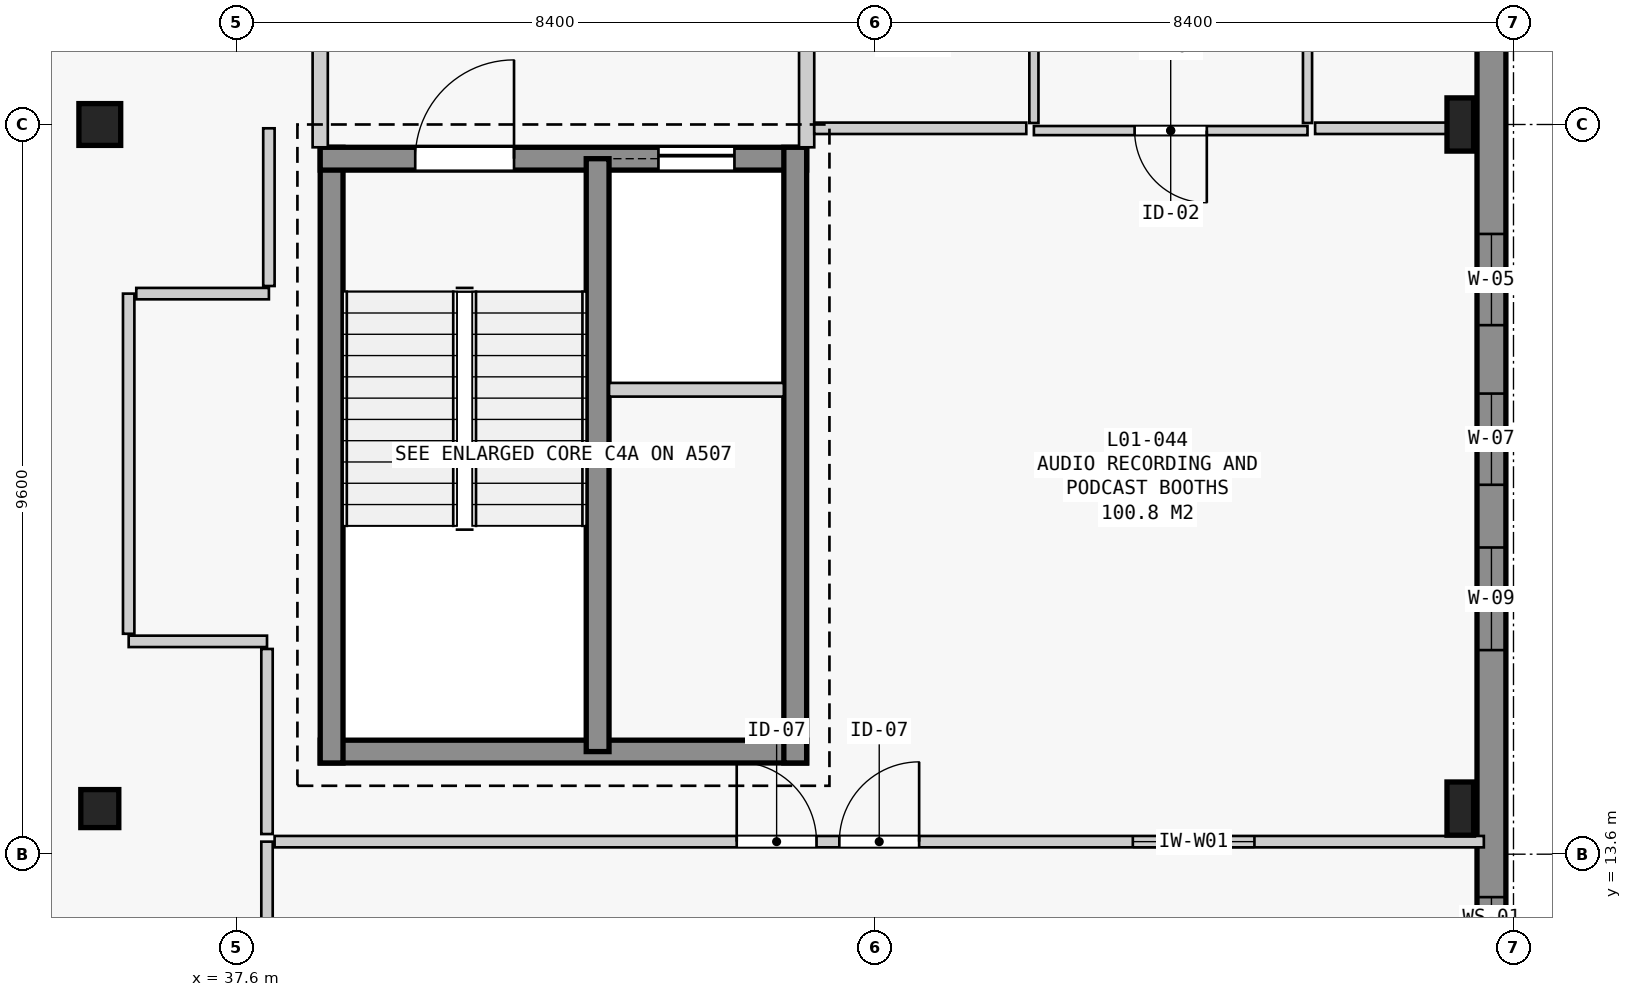
"""IFC4 building model, lengths in metres.
Left out: names, types, materials, properties, quantities, classifications, styles, units other than length and angle.
Written with IfcOpenShell. Run it as: python <this file> out.ifc"""

import sys

from ifc_helpers import new_model, si_unit, direction, frame, frame_2d, origin, origin_2d, place, context, subcontext, project, spatial, rectangle, extrude, element, fill, save


model = new_model("IFC4")
c1 = context("Model", 3, precision=1e-05, world=origin(), true_north=direction((0.0, 1.0)))
c2 = subcontext(c1, "Body", "Model", "MODEL_VIEW")
j1 = project(units=[si_unit("LENGTHUNIT", "METRE"), si_unit("PLANEANGLEUNIT", "RADIAN")], contexts=[c1])
p1 = place(None, origin())
s1 = spatial("IfcSite", under=j1, at=p1, CompositionType="ELEMENT")
p2 = place(p1, origin())
s2 = spatial("IfcBuilding", under=s1, at=p2, CompositionType="ELEMENT")
p3 = place(p2, frame((0.0, 0.0, 5.4)))
s3 = spatial("IfcBuildingStorey", under=s2, at=p3, CompositionType="ELEMENT", Elevation=5.4)
p4 = place(p3, frame((35.8, 14.2, 0.0), z_axis=(0.0, 0.0, 1.0), x_axis=(1.0, 0.0, 0.0)))
e1 = element("IfcColumn", 1, at=p4, inside=s3, PredefinedType="COLUMN", context=c2, shape_type="SweptSolid", body=[
    extrude(rectangle(XDim=0.5, YDim=0.5, at=origin_2d()), origin(), (0.0, 0.0, 1.0), 4.2),
])
p5 = place(p3, frame((35.8, 23.2, 0.0), z_axis=(0.0, 0.0, 1.0), x_axis=(1.0, 0.0, 0.0)))
e2 = element("IfcColumn", 2, at=p5, inside=s3, PredefinedType="COLUMN", context=c2, shape_type="SweptSolid", body=[
    extrude(rectangle(XDim=0.55, YDim=0.55, at=origin_2d()), origin(), (0.0, 0.0, 1.0), 4.2),
])
for number, where, z_axis, x_axis in (
    (3, (53.7, 14.2, 0.0), (0.0, 0.0, 1.0), (1.0, 0.0, 0.0)),
    (4, (53.7, 23.2, 0.0), (0.0, 0.0, 1.0), (1.0, 0.0, 0.0)),
):
    element("IfcColumn", number, at=place(p3, frame(where, z_axis=z_axis, x_axis=x_axis)), inside=s3, PredefinedType="COLUMN", context=c2, shape_type="SweptSolid", body=[
        extrude(rectangle(XDim=0.35, YDim=0.7, at=origin_2d()), origin(), (0.0, 0.0, 1.0), 4.2),
    ])
p6 = place(p3, frame((54.11, 42.11, 0.0), z_axis=(0.0, 0.0, 1.0), x_axis=(0.0, -1.0, 0.0)))
e5 = element("IfcWall", 5, at=p6, inside=s3, PredefinedType="STANDARD", context=c2, shape_type="SweptSolid", body=[
    extrude(rectangle(XDim=37.92, YDim=0.38, at=frame_2d((18.96, 0.0))), origin(), (0.0, 0.0, 1.0), 3.94),
])
p7 = place(p6, frame((1.45, 0.0, 0.95)))
e6 = element("IfcOpeningElement", 6, at=p7, cuts=e5, PredefinedType="OPENING", context=c2, shape_type="SweptSolid", body=[
    extrude(rectangle(XDim=1.2, YDim=2.4, at=frame_2d((0.6, 1.2))), frame((0.0, 0.2, 0.0), z_axis=(0.0, -1.0, 0.0), x_axis=(1.0, 0.0, 0.0)), (0.0, 0.0, 1.0), 0.4),
])
p8 = place(p6, frame((3.475, 0.0, 0.95)))
e7 = element("IfcOpeningElement", 7, at=p8, cuts=e5, PredefinedType="OPENING", context=c2, shape_type="SweptSolid", body=[
    extrude(rectangle(XDim=1.35, YDim=2.5, at=frame_2d((0.675, 1.25))), frame((0.0, 0.2, 0.0), z_axis=(0.0, -1.0, 0.0), x_axis=(1.0, 0.0, 0.0)), (0.0, 0.0, 1.0), 0.4),
])
p9 = place(p6, frame((5.5, 0.0, 0.95)))
e8 = element("IfcOpeningElement", 8, at=p9, cuts=e5, PredefinedType="OPENING", context=c2, shape_type="SweptSolid", body=[
    extrude(rectangle(XDim=1.5, YDim=2.2, at=frame_2d((0.75, 1.1))), frame((0.0, 0.2, 0.0), z_axis=(0.0, -1.0, 0.0), x_axis=(1.0, 0.0, 0.0)), (0.0, 0.0, 1.0), 0.4),
])
p10 = place(p6, frame((8.075, 0.0, 0.95)))
e9 = element("IfcOpeningElement", 9, at=p10, cuts=e5, PredefinedType="OPENING", context=c2, shape_type="SweptSolid", body=[
    extrude(rectangle(XDim=0.55, YDim=2.1, at=frame_2d((0.275, 1.05))), frame((0.0, 0.2, 0.0), z_axis=(0.0, -1.0, 0.0), x_axis=(1.0, 0.0, 0.0)), (0.0, 0.0, 1.0), 0.4),
])
p11 = place(p6, frame((10.15, 0.0, 0.95)))
e10 = element("IfcOpeningElement", 10, at=p11, cuts=e5, PredefinedType="OPENING", context=c2, shape_type="SweptSolid", body=[
    extrude(rectangle(XDim=0.6, YDim=2.2, at=frame_2d((0.3, 1.1))), frame((0.0, 0.2, 0.0), z_axis=(0.0, -1.0, 0.0), x_axis=(1.0, 0.0, 0.0)), (0.0, 0.0, 1.0), 0.4),
])
p12 = place(p6, frame((12.225, 0.0, 0.95)))
e11 = element("IfcOpeningElement", 11, at=p12, cuts=e5, PredefinedType="OPENING", context=c2, shape_type="SweptSolid", body=[
    extrude(rectangle(XDim=0.65, YDim=2.4, at=frame_2d((0.325, 1.2))), frame((0.0, 0.2, 0.0), z_axis=(0.0, -1.0, 0.0), x_axis=(1.0, 0.0, 0.0)), (0.0, 0.0, 1.0), 0.4),
])
p13 = place(p6, frame((14.275, 0.0, 0.95)))
e12 = element("IfcOpeningElement", 12, at=p13, cuts=e5, PredefinedType="OPENING", context=c2, shape_type="SweptSolid", body=[
    extrude(rectangle(XDim=0.75, YDim=2.3, at=frame_2d((0.375, 1.15))), frame((0.0, 0.2, 0.0), z_axis=(0.0, -1.0, 0.0), x_axis=(1.0, 0.0, 0.0)), (0.0, 0.0, 1.0), 0.4),
])
p14 = place(p6, frame((16.3, 0.0, 0.95)))
e13 = element("IfcOpeningElement", 13, at=p14, cuts=e5, PredefinedType="OPENING", context=c2, shape_type="SweptSolid", body=[
    extrude(rectangle(XDim=0.9, YDim=2.2, at=frame_2d((0.45, 1.1))), frame((0.0, 0.2, 0.0), z_axis=(0.0, -1.0, 0.0), x_axis=(1.0, 0.0, 0.0)), (0.0, 0.0, 1.0), 0.4),
])
p15 = place(p6, frame((20.35, 0.0, 0.95)))
e14 = element("IfcOpeningElement", 14, at=p15, cuts=e5, PredefinedType="OPENING", context=c2, shape_type="SweptSolid", body=[
    extrude(rectangle(XDim=1.2, YDim=1.8, at=frame_2d((0.6, 0.9))), frame((0.0, 0.2, 0.0), z_axis=(0.0, -1.0, 0.0), x_axis=(1.0, 0.0, 0.0)), (0.0, 0.0, 1.0), 0.4),
])
p16 = place(p6, frame((22.45, 0.0, 0.95)))
e15 = element("IfcOpeningElement", 15, at=p16, cuts=e5, PredefinedType="OPENING", context=c2, shape_type="SweptSolid", body=[
    extrude(rectangle(XDim=1.2, YDim=2.4, at=frame_2d((0.6, 1.2))), frame((0.0, 0.2, 0.0), z_axis=(0.0, -1.0, 0.0), x_axis=(1.0, 0.0, 0.0)), (0.0, 0.0, 1.0), 0.4),
])
p17 = place(p6, frame((24.475, 0.0, 0.95)))
e16 = element("IfcOpeningElement", 16, at=p17, cuts=e5, PredefinedType="OPENING", context=c2, shape_type="SweptSolid", body=[
    extrude(rectangle(XDim=1.35, YDim=2.5, at=frame_2d((0.675, 1.25))), frame((0.0, 0.2, 0.0), z_axis=(0.0, -1.0, 0.0), x_axis=(1.0, 0.0, 0.0)), (0.0, 0.0, 1.0), 0.4),
])
p18 = place(p6, frame((29.075, 0.0, 0.95)))
e17 = element("IfcOpeningElement", 17, at=p18, cuts=e5, PredefinedType="OPENING", context=c2, shape_type="SweptSolid", body=[
    extrude(rectangle(XDim=0.55, YDim=1.8, at=frame_2d((0.275, 0.9))), frame((0.0, 0.2, 0.0), z_axis=(0.0, -1.0, 0.0), x_axis=(1.0, 0.0, 0.0)), (0.0, 0.0, 1.0), 0.4),
])
p19 = place(p6, frame((31.15, 0.0, 0.95)))
e18 = element("IfcOpeningElement", 18, at=p19, cuts=e5, PredefinedType="OPENING", context=c2, shape_type="SweptSolid", body=[
    extrude(rectangle(XDim=0.6, YDim=1.9, at=frame_2d((0.3, 0.95))), frame((0.0, 0.2, 0.0), z_axis=(0.0, -1.0, 0.0), x_axis=(1.0, 0.0, 0.0)), (0.0, 0.0, 1.0), 0.4),
])
p20 = place(p6, frame((33.225, 0.0, 0.95)))
e19 = element("IfcOpeningElement", 19, at=p20, cuts=e5, PredefinedType="OPENING", context=c2, shape_type="SweptSolid", body=[
    extrude(rectangle(XDim=0.65, YDim=2.0, at=frame_2d((0.325, 1.0))), frame((0.0, 0.2, 0.0), z_axis=(0.0, -1.0, 0.0), x_axis=(1.0, 0.0, 0.0)), (0.0, 0.0, 1.0), 0.4),
])
p21 = place(p6, frame((35.3, 0.0, 0.95)))
e20 = element("IfcOpeningElement", 20, at=p21, cuts=e5, PredefinedType="OPENING", context=c2, shape_type="SweptSolid", body=[
    extrude(rectangle(XDim=0.7, YDim=2.1, at=frame_2d((0.35, 1.05))), frame((0.0, 0.2, 0.0), z_axis=(0.0, -1.0, 0.0), x_axis=(1.0, 0.0, 0.0)), (0.0, 0.0, 1.0), 0.4),
])
p22 = place(p3, frame((45.1, 14.95, 0.0), z_axis=(0.0, 0.0, 1.0), x_axis=(-1.0, 0.0, 0.0)))
e21 = element("IfcWall", 21, at=p22, inside=s3, PredefinedType="SHEAR", context=c2, shape_type="SweptSolid", body=[
    extrude(rectangle(XDim=6.4, YDim=0.3, at=frame_2d((3.2, 0.0))), origin(), (0.0, 0.0, 1.0), 3.94),
])
p23 = place(p3, frame((38.85, 14.8, 0.0), z_axis=(0.0, 0.0, 1.0), x_axis=(0.0, 1.0, 0.0)))
e22 = element("IfcWall", 22, at=p23, inside=s3, PredefinedType="SHEAR", context=c2, shape_type="SweptSolid", body=[
    extrude(rectangle(XDim=8.1, YDim=0.3, at=frame_2d((4.05, 0.0))), origin(), (0.0, 0.0, 1.0), 3.94),
])
p24 = place(p3, frame((38.7, 22.75, 0.0), z_axis=(0.0, 0.0, 1.0), x_axis=(1.0, 0.0, 0.0)))
e23 = element("IfcWall", 23, at=p24, inside=s3, PredefinedType="SHEAR", context=c2, shape_type="SweptSolid", body=[
    extrude(rectangle(XDim=6.4, YDim=0.3, at=frame_2d((3.2, 0.0))), origin(), (0.0, 0.0, 1.0), 3.94),
])
p25 = place(p24, frame((1.25, 0.0, 0.0)))
e24 = element("IfcOpeningElement", 24, at=p25, cuts=e23, PredefinedType="OPENING", context=c2, shape_type="SweptSolid", body=[
    extrude(rectangle(XDim=1.3, YDim=2.2, at=frame_2d((0.65, 1.1))), frame((0.0, 0.16, 0.0), z_axis=(0.0, -1.0, 0.0), x_axis=(1.0, 0.0, 0.0)), (0.0, 0.0, 1.0), 0.32),
])
p26 = place(p24, frame((4.45, 0.0, 0.0)))
e25 = element("IfcOpeningElement", 25, at=p26, cuts=e23, PredefinedType="OPENING", context=c2, shape_type="SweptSolid", body=[
    extrude(rectangle(XDim=1.0, YDim=2.15, at=frame_2d((0.5, 1.075))), frame((0.0, 0.16, 0.0), z_axis=(0.0, -1.0, 0.0), x_axis=(1.0, 0.0, 0.0)), (0.0, 0.0, 1.0), 0.32),
])
p27 = place(p3, frame((44.95, 22.9, 0.0), z_axis=(0.0, 0.0, 1.0), x_axis=(0.0, -1.0, 0.0)))
e26 = element("IfcWall", 26, at=p27, inside=s3, PredefinedType="SHEAR", context=c2, shape_type="SweptSolid", body=[
    extrude(rectangle(XDim=8.1, YDim=0.3, at=frame_2d((4.05, 0.0))), origin(), (0.0, 0.0, 1.0), 3.94),
])
p28 = place(p3, frame((42.35, 14.95, 0.0), z_axis=(0.0, 0.0, 1.0), x_axis=(0.0, 1.0, 0.0)))
e27 = element("IfcWall", 27, at=p28, inside=s3, PredefinedType="SHEAR", context=c2, shape_type="SweptSolid", body=[
    extrude(rectangle(XDim=7.8, YDim=0.3, at=frame_2d((3.9, 0.0))), origin(), (0.0, 0.0, 1.0), 3.94),
])
p29 = place(p3, frame((42.5, 19.71, 0.0), z_axis=(0.0, 0.0, 1.0), x_axis=(1.0, 0.0, 0.0)))
e28 = element("IfcWall", 28, at=p29, inside=s3, PredefinedType="PARTITIONING", context=c2, shape_type="SweptSolid", body=[
    extrude(rectangle(XDim=2.3, YDim=0.18, at=frame_2d((1.15, 0.0))), origin(), (0.0, 0.0, 1.0), 3.94),
])
for number, where, z_axis, x_axis in (
    (29, (38.7, 22.9, 0.0), (0.0, 0.0, 1.0), (0.0, 1.0, 0.0)),
    (30, (45.1, 26.5, 0.0), (0.0, 0.0, 1.0), (0.0, -1.0, 0.0)),
):
    element("IfcWall", number, at=place(p3, frame(where, z_axis=z_axis, x_axis=x_axis)), inside=s3, PredefinedType="STANDARD", context=c2, shape_type="SweptSolid", body=[
        extrude(rectangle(XDim=3.6, YDim=0.2, at=frame_2d((1.8, 0.0))), origin(), (0.0, 0.0, 1.0), 3.12),
    ])
p30 = place(p3, frame((51.69, 23.12, 0.0), z_axis=(0.0, 0.0, 1.0), x_axis=(-1.0, 0.0, 0.0)))
e31 = element("IfcWall", 31, at=p30, inside=s3, PredefinedType="PARTITIONING", context=c2, shape_type="SweptSolid", body=[
    extrude(rectangle(XDim=3.6, YDim=0.12, at=frame_2d((1.8, 0.0))), origin(), (0.0, 0.0, 1.0), 3.12),
])
p31 = place(p30, frame((1.325, 0.0, 0.0)))
e32 = element("IfcOpeningElement", 32, at=p31, cuts=e31, PredefinedType="OPENING", context=c2, shape_type="SweptSolid", body=[
    extrude(rectangle(XDim=0.95, YDim=2.15, at=frame_2d((0.475, 1.075))), frame((0.0, 0.07, 0.0), z_axis=(0.0, -1.0, 0.0), x_axis=(1.0, 0.0, 0.0)), (0.0, 0.0, 1.0), 0.14),
])
p32 = place(p3, frame((48.09, 23.22, 0.0), z_axis=(0.0, 0.0, 1.0), x_axis=(0.0, 1.0, 0.0)))
e33 = element("IfcWall", 33, at=p32, inside=s3, PredefinedType="PARTITIONING", context=c2, shape_type="SweptSolid", body=[
    extrude(rectangle(XDim=3.1, YDim=0.12, at=frame_2d((1.55, 0.0))), origin(), (0.0, 0.0, 1.0), 3.12),
])
p33 = place(p32, frame((1.0, 0.0, 0.0)))
e34 = element("IfcOpeningElement", 34, at=p33, cuts=e33, PredefinedType="OPENING", context=c2, shape_type="SweptSolid", body=[
    extrude(rectangle(XDim=1.1, YDim=2.2, at=frame_2d((0.55, 1.1))), frame((0.0, 0.07, 0.0), z_axis=(0.0, -1.0, 0.0), x_axis=(1.0, 0.0, 0.0)), (0.0, 0.0, 1.0), 0.14),
])
p34 = place(p3, frame((51.69, 26.22, 0.0), z_axis=(0.0, 0.0, 1.0), x_axis=(0.0, -1.0, 0.0)))
e35 = element("IfcWall", 35, at=p34, inside=s3, PredefinedType="PARTITIONING", context=c2, shape_type="SweptSolid", body=[
    extrude(rectangle(XDim=3.0, YDim=0.12, at=frame_2d((1.5, 0.0))), origin(), (0.0, 0.0, 1.0), 3.12),
])
p35 = place(p3, frame((38.0, 12.1, 0.0), z_axis=(0.0, 0.0, 1.0), x_axis=(0.0, 1.0, 0.0)))
e36 = element("IfcWall", 36, at=p35, inside=s3, PredefinedType="PARTITIONING", context=c2, shape_type="SweptSolid", body=[
    extrude(rectangle(XDim=1.665, YDim=0.15, at=frame_2d((0.833, 0.0))), origin(), (0.0, 0.0, 1.0), 3.94),
])
p36 = place(p3, frame((38.1, 13.765, 0.0), z_axis=(0.0, 0.0, 1.0), x_axis=(1.0, 0.0, 0.0)))
e37 = element("IfcWall", 37, at=p36, inside=s3, PredefinedType="PARTITIONING", context=c2, shape_type="SweptSolid", body=[
    extrude(rectangle(XDim=15.91, YDim=0.15, at=frame_2d((7.955, 0.0))), origin(), (0.0, 0.0, 1.0), 3.22),
])
p37 = place(p36, frame((7.43, 0.0, 0.0)))
e38 = element("IfcOpeningElement", 38, at=p37, cuts=e37, PredefinedType="OPENING", context=c2, shape_type="SweptSolid", body=[
    extrude(rectangle(XDim=1.05, YDim=2.2, at=frame_2d((0.525, 1.1))), frame((0.0, 0.085, 0.0), z_axis=(0.0, -1.0, 0.0), x_axis=(1.0, 0.0, 0.0)), (0.0, 0.0, 1.0), 0.17),
])
p38 = place(p36, frame((11.292, 0.0, 1.05)))
e39 = element("IfcOpeningElement", 39, at=p38, cuts=e37, PredefinedType="OPENING", context=c2, shape_type="SweptSolid", body=[
    extrude(rectangle(XDim=1.6, YDim=1.5, at=frame_2d((0.8, 0.75))), frame((0.0, 0.085, 0.0), z_axis=(0.0, -1.0, 0.0), x_axis=(1.0, 0.0, 0.0)), (0.0, 0.0, 1.0), 0.17),
])
p39 = place(p36, frame((6.08, 0.0, 0.0)))
e40 = element("IfcOpeningElement", 40, at=p39, cuts=e37, PredefinedType="OPENING", context=c2, shape_type="SweptSolid", body=[
    extrude(rectangle(XDim=1.05, YDim=2.2, at=frame_2d((0.525, 1.1))), frame((0.0, 0.085, 0.0), z_axis=(0.0, -1.0, 0.0), x_axis=(1.0, 0.0, 0.0)), (0.0, 0.0, 1.0), 0.17),
])
p40 = place(p3, frame((38.0, 16.4, 0.0), z_axis=(0.0, 0.0, 1.0), x_axis=(-1.0, 0.0, 0.0)))
e41 = element("IfcWall", 41, at=p40, inside=s3, PredefinedType="PARTITIONING", context=c2, shape_type="SweptSolid", body=[
    extrude(rectangle(XDim=1.82, YDim=0.15, at=frame_2d((0.91, 0.0))), origin(), (0.0, 0.0, 1.0), 3.94),
])
p41 = place(p3, frame((36.18, 16.5, 0.0), z_axis=(0.0, 0.0, 1.0), x_axis=(0.0, 1.0, 0.0)))
e42 = element("IfcWall", 42, at=p41, inside=s3, PredefinedType="PARTITIONING", context=c2, shape_type="SweptSolid", body=[
    extrude(rectangle(XDim=4.475, YDim=0.15, at=frame_2d((2.238, 0.0))), origin(), (0.0, 0.0, 1.0), 3.94),
])
p42 = place(p3, frame((36.28, 20.975, 0.0), z_axis=(0.0, 0.0, 1.0), x_axis=(1.0, 0.0, 0.0)))
e43 = element("IfcWall", 43, at=p42, inside=s3, PredefinedType="PARTITIONING", context=c2, shape_type="SweptSolid", body=[
    extrude(rectangle(XDim=1.745, YDim=0.15, at=frame_2d((0.873, 0.0))), origin(), (0.0, 0.0, 1.0), 3.94),
])
p43 = place(p3, frame((38.025, 21.075, 0.0), z_axis=(0.0, 0.0, 1.0), x_axis=(0.0, 1.0, 0.0)))
e44 = element("IfcWall", 44, at=p43, inside=s3, PredefinedType="PARTITIONING", context=c2, shape_type="SweptSolid", body=[
    extrude(rectangle(XDim=2.075, YDim=0.15, at=frame_2d((1.038, 0.0))), origin(), (0.0, 0.0, 1.0), 3.12),
])
p44 = place(p3, frame((38.0, 13.865, 0.0), z_axis=(0.0, 0.0, 1.0), x_axis=(0.0, 1.0, 0.0)))
e45 = element("IfcWall", 45, at=p44, inside=s3, PredefinedType="PARTITIONING", context=c2, shape_type="SweptSolid", body=[
    extrude(rectangle(XDim=2.435, YDim=0.15, at=frame_2d((1.218, 0.0))), origin(), (0.0, 0.0, 1.0), 3.22),
])
p45 = place(p3, frame((53.92, 23.15, 0.0), z_axis=(0.0, 0.0, 1.0), x_axis=(-1.0, 0.0, 0.0)))
e46 = element("IfcWall", 46, at=p45, inside=s3, PredefinedType="PARTITIONING", context=c2, shape_type="SweptSolid", body=[
    extrude(rectangle(XDim=2.13, YDim=0.15, at=frame_2d((1.065, 0.0))), origin(), (0.0, 0.0, 1.0), 3.12),
])
p46 = place(p3, frame((47.99, 23.15, 0.0), z_axis=(0.0, 0.0, 1.0), x_axis=(-1.0, 0.0, 0.0)))
e47 = element("IfcWall", 47, at=p46, inside=s3, PredefinedType="PARTITIONING", context=c2, shape_type="SweptSolid", body=[
    extrude(rectangle(XDim=2.79, YDim=0.15, at=frame_2d((1.395, 0.0))), origin(), (0.0, 0.0, 1.0), 3.12),
])
p47 = place(p15, origin())
e48 = element("IfcWindow", 48, at=p47, inside=s3, PartitioningType="SINGLE_PANEL", PredefinedType="WINDOW", context=c2, shape_type="SweptSolid", body=[
    extrude(rectangle(XDim=1.2, YDim=1.8, at=frame_2d((0.6, 0.9))), frame((0.0, 0.03, 0.0), z_axis=(0.0, -1.0, 0.0), x_axis=(1.0, 0.0, 0.0)), (0.0, 0.0, 1.0), 0.06),
])
fill(e14, e48)
p48 = place(p16, origin())
e49 = element("IfcWindow", 49, at=p48, inside=s3, PartitioningType="SINGLE_PANEL", PredefinedType="WINDOW", context=c2, shape_type="SweptSolid", body=[
    extrude(rectangle(XDim=1.2, YDim=2.4, at=frame_2d((0.6, 1.2))), frame((0.0, 0.03, 0.0), z_axis=(0.0, -1.0, 0.0), x_axis=(1.0, 0.0, 0.0)), (0.0, 0.0, 1.0), 0.06),
])
fill(e15, e49)
p49 = place(p17, origin())
e50 = element("IfcWindow", 50, at=p49, inside=s3, PartitioningType="SINGLE_PANEL", PredefinedType="WINDOW", context=c2, shape_type="SweptSolid", body=[
    extrude(rectangle(XDim=1.35, YDim=2.5, at=frame_2d((0.675, 1.25))), frame((0.0, 0.03, 0.0), z_axis=(0.0, -1.0, 0.0), x_axis=(1.0, 0.0, 0.0)), (0.0, 0.0, 1.0), 0.06),
])
fill(e16, e50)
p50 = place(p18, origin())
e51 = element("IfcWindow", 51, at=p50, inside=s3, PartitioningType="SINGLE_PANEL", PredefinedType="WINDOW", context=c2, shape_type="SweptSolid", body=[
    extrude(rectangle(XDim=0.55, YDim=1.8, at=frame_2d((0.275, 0.9))), frame((0.0, 0.03, 0.0), z_axis=(0.0, -1.0, 0.0), x_axis=(1.0, 0.0, 0.0)), (0.0, 0.0, 1.0), 0.06),
])
fill(e17, e51)
p51 = place(p25, origin())
e52 = element("IfcDoor", 52, at=p51, inside=s3, OperationType="SINGLE_SWING_RIGHT", PredefinedType="DOOR", context=c2, shape_type="SweptSolid", body=[
    extrude(rectangle(XDim=1.3, YDim=2.2, at=frame_2d((0.65, 1.1))), frame((0.0, 0.025, 0.0), z_axis=(0.0, -1.0, 0.0), x_axis=(1.0, 0.0, 0.0)), (0.0, 0.0, 1.0), 0.05),
])
fill(e24, e52)
p52 = place(p26, origin())
e53 = element("IfcDoor", 53, at=p52, inside=s3, OperationType="SLIDING_TO_LEFT", PredefinedType="DOOR", context=c2, shape_type="SweptSolid", body=[
    extrude(rectangle(XDim=1.0, YDim=2.15, at=frame_2d((0.5, 1.075))), frame((0.0, 0.025, 0.0), z_axis=(0.0, -1.0, 0.0), x_axis=(1.0, 0.0, 0.0)), (0.0, 0.0, 1.0), 0.05),
])
fill(e25, e53)
p53 = place(p31, origin())
e54 = element("IfcDoor", 54, at=p53, inside=s3, OperationType="SINGLE_SWING_LEFT", PredefinedType="DOOR", context=c2, shape_type="SweptSolid", body=[
    extrude(rectangle(XDim=0.95, YDim=2.15, at=frame_2d((0.475, 1.075))), frame((0.0, 0.025, 0.0), z_axis=(0.0, -1.0, 0.0), x_axis=(1.0, 0.0, 0.0)), (0.0, 0.0, 1.0), 0.05),
])
fill(e32, e54)
p54 = place(p37, origin())
e55 = element("IfcDoor", 55, at=p54, inside=s3, OperationType="SINGLE_SWING_RIGHT", PredefinedType="DOOR", context=c2, shape_type="SweptSolid", body=[
    extrude(rectangle(XDim=1.05, YDim=2.2, at=frame_2d((0.525, 1.1))), frame((0.0, 0.025, 0.0), z_axis=(0.0, -1.0, 0.0), x_axis=(1.0, 0.0, 0.0)), (0.0, 0.0, 1.0), 0.05),
])
fill(e38, e55)
p55 = place(p38, origin())
e56 = element("IfcWindow", 56, at=p55, inside=s3, PartitioningType="SINGLE_PANEL", PredefinedType="WINDOW", context=c2, shape_type="SweptSolid", body=[
    extrude(rectangle(XDim=1.6, YDim=1.5, at=frame_2d((0.8, 0.75))), frame((0.0, 0.03, 0.0), z_axis=(0.0, -1.0, 0.0), x_axis=(1.0, 0.0, 0.0)), (0.0, 0.0, 1.0), 0.06),
])
fill(e39, e56)
p56 = place(p39, origin())
e57 = element("IfcDoor", 57, at=p56, inside=s3, OperationType="SINGLE_SWING_LEFT", PredefinedType="DOOR", context=c2, shape_type="SweptSolid", body=[
    extrude(rectangle(XDim=1.05, YDim=2.2, at=frame_2d((0.525, 1.1))), frame((0.0, 0.025, 0.0), z_axis=(0.0, -1.0, 0.0), x_axis=(1.0, 0.0, 0.0)), (0.0, 0.0, 1.0), 0.05),
])
fill(e40, e57)
save(model, sys.argv[1])
